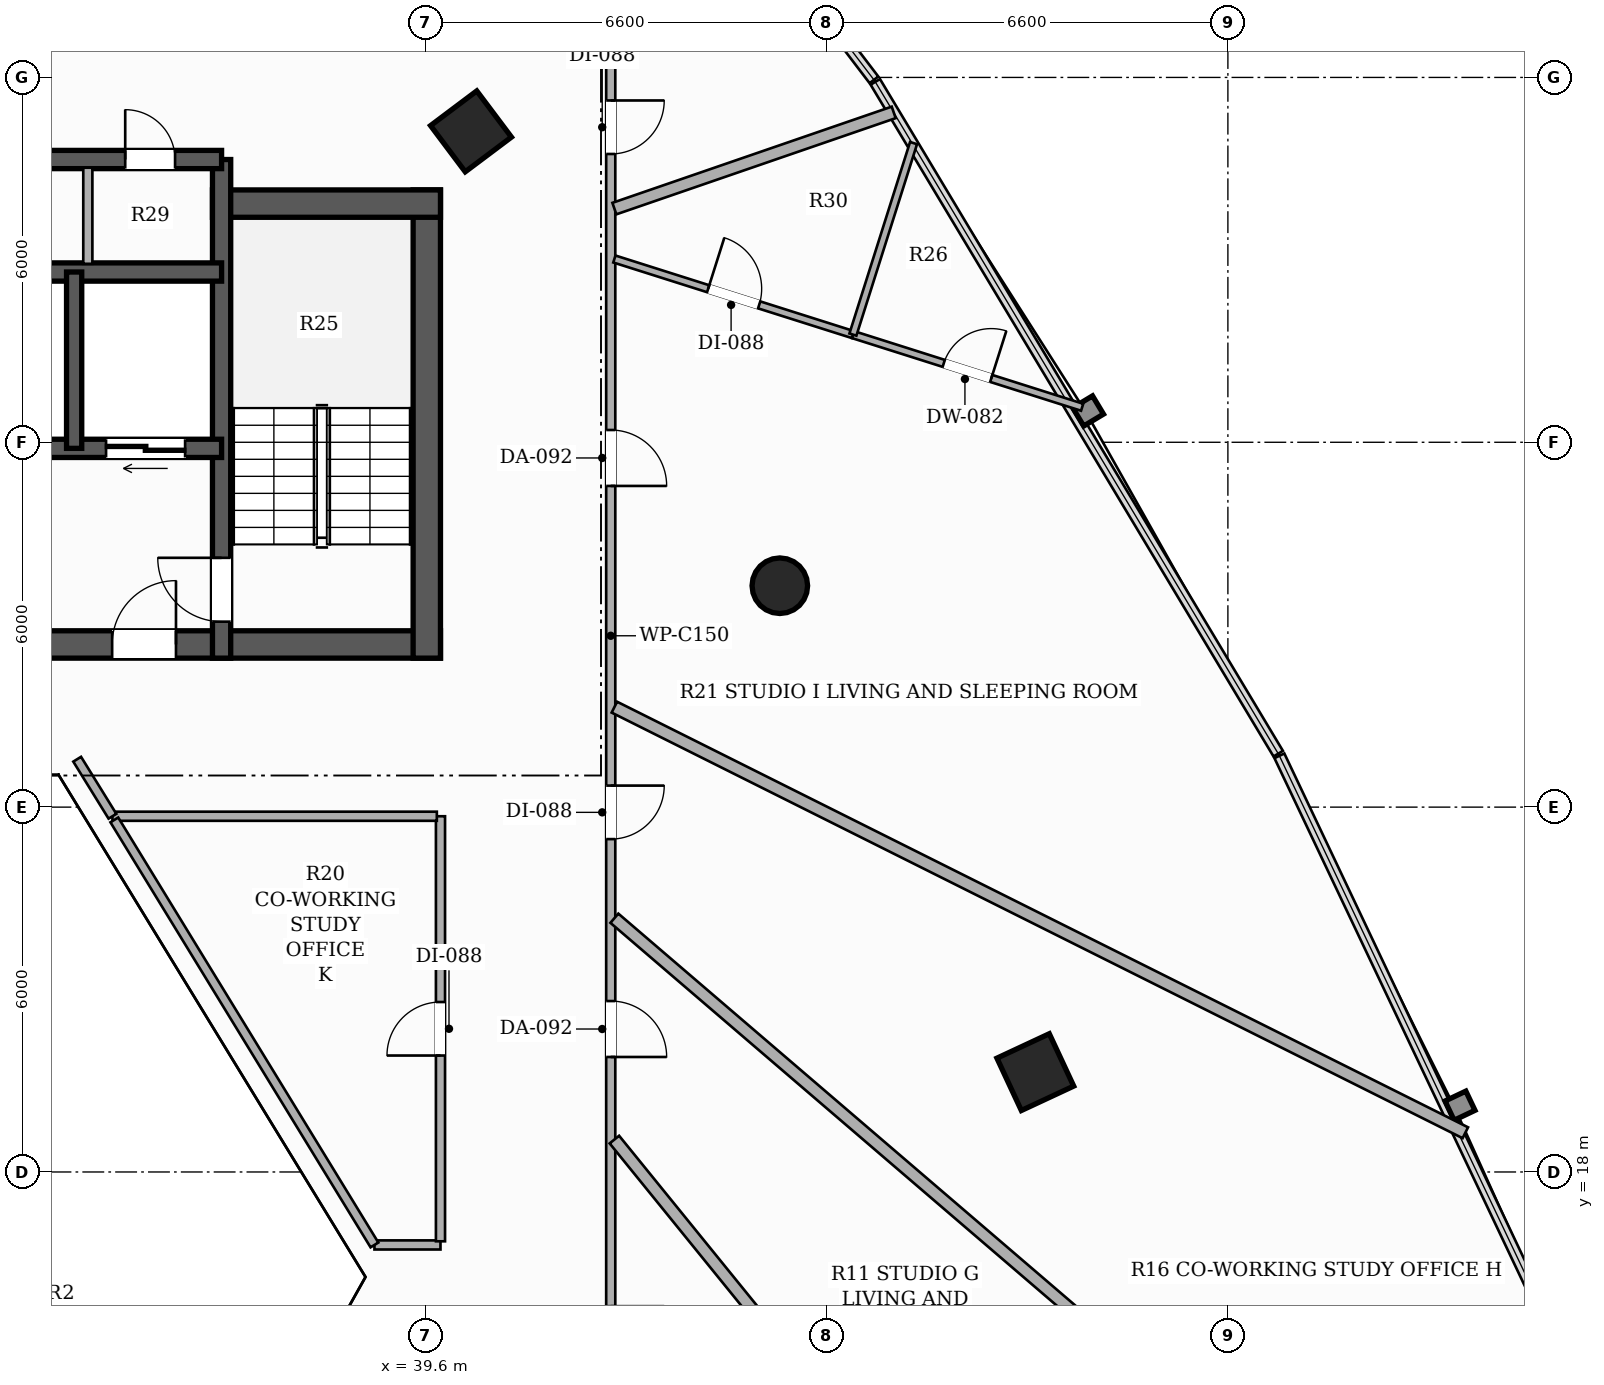
"""IFC4 building model, lengths in metres.
Left out: names, types, materials, properties, quantities, classifications, styles, units other than length and angle.
Written with IfcOpenShell. Run it as: python <this file> out.ifc"""

import sys

from ifc_helpers import new_model, si_unit, direction, frame, frame_2d, origin, origin_2d, place, context, subcontext, project, spatial, rectangle, hollow_rectangle, hollow_circle, extrude, element, fill, save


model = new_model("IFC4")
c1 = context("Model", 3, precision=1e-05, world=origin(), true_north=direction((0.0, 1.0)))
c2 = subcontext(c1, "Body", "Model", "MODEL_VIEW")
j1 = project(units=[si_unit("LENGTHUNIT", "METRE"), si_unit("PLANEANGLEUNIT", "RADIAN")], contexts=[c1])
p1 = place(None, origin())
s1 = spatial("IfcSite", under=j1, at=p1, CompositionType="ELEMENT")
p2 = place(p1, origin())
s2 = spatial("IfcBuilding", under=s1, at=p2, CompositionType="ELEMENT")
p3 = place(p2, frame((0.0, 0.0, 40.1)))
s3 = spatial("IfcBuildingStorey", under=s2, at=p3, CompositionType="ELEMENT", Elevation=40.1)
p4 = place(p3, frame((26.15, 26.675, 0.0), z_axis=(0.0, 0.0, 1.0), x_axis=(1.0, 0.0, 0.0)))
e1 = element("IfcWall", 1, at=p4, inside=s3, PredefinedType="SHEAR", context=c2, shape_type="SweptSolid", body=[
    extrude(rectangle(XDim=13.7, YDim=0.45, at=frame_2d((6.85, 0.0))), origin(), (0.0, 0.0, 1.0), 3.3),
])
p5 = place(p4, frame((4.35, 0.0, 0.0)))
e2 = element("IfcOpeningElement", 2, at=p5, cuts=e1, PredefinedType="OPENING", context=c2, shape_type="SweptSolid", body=[
    extrude(rectangle(XDim=1.05, YDim=2.15, at=frame_2d((0.525, 1.075))), frame((0.0, 0.235, 0.0), z_axis=(0.0, -1.0, 0.0), x_axis=(1.0, 0.0, 0.0)), (0.0, 0.0, 1.0), 0.47),
])
p6 = place(p4, frame((8.3, 0.0, 0.0)))
e3 = element("IfcOpeningElement", 3, at=p6, cuts=e1, PredefinedType="OPENING", context=c2, shape_type="SweptSolid", body=[
    extrude(rectangle(XDim=1.05, YDim=2.15, at=frame_2d((0.525, 1.075))), frame((0.0, 0.235, 0.0), z_axis=(0.0, -1.0, 0.0), x_axis=(1.0, 0.0, 0.0)), (0.0, 0.0, 1.0), 0.47),
])
p7 = place(p3, frame((39.625, 26.45, 0.0), z_axis=(0.0, 0.0, 1.0), x_axis=(0.0, 1.0, 0.0)))
e4 = element("IfcWall", 4, at=p7, inside=s3, PredefinedType="SHEAR", context=c2, shape_type="SweptSolid", body=[
    extrude(rectangle(XDim=7.7, YDim=0.45, at=frame_2d((3.85, 0.0))), origin(), (0.0, 0.0, 1.0), 3.3),
])
p8 = place(p3, frame((36.1, 33.925, 0.0), z_axis=(0.0, 0.0, 1.0), x_axis=(1.0, 0.0, 0.0)))
e5 = element("IfcWall", 5, at=p8, inside=s3, PredefinedType="SHEAR", context=c2, shape_type="SweptSolid", body=[
    extrude(rectangle(XDim=3.75, YDim=0.45, at=frame_2d((1.875, 0.0))), origin(), (0.0, 0.0, 1.0), 3.3),
])
p9 = place(p3, frame((36.25, 26.45, 0.0), z_axis=(0.0, 0.0, 1.0), x_axis=(0.0, 1.0, 0.0)))
e6 = element("IfcWall", 6, at=p9, inside=s3, PredefinedType="SHEAR", context=c2, shape_type="SweptSolid", body=[
    extrude(rectangle(XDim=8.2, YDim=0.3, at=frame_2d((4.1, 0.0))), origin(), (0.0, 0.0, 1.0), 3.3),
])
p10 = place(p9, frame((0.6, 0.0, 0.0)))
e7 = element("IfcOpeningElement", 7, at=p10, cuts=e6, PredefinedType="OPENING", context=c2, shape_type="SweptSolid", body=[
    extrude(rectangle(XDim=1.05, YDim=2.15, at=frame_2d((0.525, 1.075))), frame((0.0, 0.16, 0.0), z_axis=(0.0, -1.0, 0.0), x_axis=(1.0, 0.0, 0.0)), (0.0, 0.0, 1.0), 0.32),
])
p11 = place(p3, frame((36.25, 29.9, 0.0), z_axis=(0.0, 0.0, 1.0), x_axis=(-1.0, 0.0, 0.0)))
e8 = element("IfcWall", 8, at=p11, inside=s3, PredefinedType="SHEAR", context=c2, shape_type="SweptSolid", body=[
    extrude(rectangle(XDim=6.5, YDim=0.3, at=frame_2d((3.25, 0.0))), origin(), (0.0, 0.0, 1.0), 3.3),
])
p12 = place(p11, frame((4.875, 0.0, 0.0)))
e9 = element("IfcOpeningElement", 9, at=p12, cuts=e8, PredefinedType="OPENING", context=c2, shape_type="SweptSolid", body=[
    extrude(rectangle(XDim=1.1, YDim=2.2, at=frame_2d((0.55, 1.1))), frame((0.0, 0.16, 0.0), z_axis=(0.0, -1.0, 0.0), x_axis=(1.0, 0.0, 0.0)), (0.0, 0.0, 1.0), 0.32),
])
p13 = place(p11, frame((2.875, 0.0, 0.0)))
e10 = element("IfcOpeningElement", 10, at=p13, cuts=e8, PredefinedType="OPENING", context=c2, shape_type="SweptSolid", body=[
    extrude(rectangle(XDim=1.1, YDim=2.2, at=frame_2d((0.55, 1.1))), frame((0.0, 0.16, 0.0), z_axis=(0.0, -1.0, 0.0), x_axis=(1.0, 0.0, 0.0)), (0.0, 0.0, 1.0), 0.32),
])
p14 = place(p11, frame((0.6, 0.0, 0.0)))
e11 = element("IfcOpeningElement", 11, at=p14, cuts=e8, PredefinedType="OPENING", context=c2, shape_type="SweptSolid", body=[
    extrude(rectangle(XDim=1.3, YDim=2.2, at=frame_2d((0.65, 1.1))), frame((0.0, 0.16, 0.0), z_axis=(0.0, -1.0, 0.0), x_axis=(1.0, 0.0, 0.0)), (0.0, 0.0, 1.0), 0.32),
])
p15 = place(p3, frame((29.75, 32.8, 0.0), z_axis=(0.0, 0.0, 1.0), x_axis=(1.0, 0.0, 0.0)))
e12 = element("IfcWall", 12, at=p15, inside=s3, PredefinedType="SHEAR", context=c2, shape_type="SweptSolid", body=[
    extrude(rectangle(XDim=6.5, YDim=0.3, at=frame_2d((3.25, 0.0))), origin(), (0.0, 0.0, 1.0), 3.3),
])
p16 = place(p3, frame((33.825, 29.9, 0.0), z_axis=(0.0, 0.0, 1.0), x_axis=(0.0, 1.0, 0.0)))
e13 = element("IfcWall", 13, at=p16, inside=s3, PredefinedType="SHEAR", context=c2, shape_type="SweptSolid", body=[
    extrude(rectangle(XDim=2.9, YDim=0.25, at=frame_2d((1.45, 0.0))), origin(), (0.0, 0.0, 1.0), 3.3),
])
p17 = place(p3, frame((29.75, 34.65, 0.0), z_axis=(0.0, 0.0, 1.0), x_axis=(1.0, 0.0, 0.0)))
e14 = element("IfcWall", 14, at=p17, inside=s3, PredefinedType="SHEAR", context=c2, shape_type="SweptSolid", body=[
    extrude(rectangle(XDim=6.5, YDim=0.3, at=frame_2d((3.25, 0.0))), origin(), (0.0, 0.0, 1.0), 3.3),
])
p18 = place(p17, frame((0.765, 0.0, 0.0)))
e15 = element("IfcOpeningElement", 15, at=p18, cuts=e14, PredefinedType="OPENING", context=c2, shape_type="SweptSolid", body=[
    extrude(rectangle(XDim=0.82, YDim=2.1, at=frame_2d((0.41, 1.05))), frame((0.0, 0.16, 0.0), z_axis=(0.0, -1.0, 0.0), x_axis=(1.0, 0.0, 0.0)), (0.0, 0.0, 1.0), 0.32),
])
p19 = place(p17, frame((2.84, 0.0, 0.0)))
e16 = element("IfcOpeningElement", 16, at=p19, cuts=e14, PredefinedType="OPENING", context=c2, shape_type="SweptSolid", body=[
    extrude(rectangle(XDim=0.82, YDim=2.1, at=frame_2d((0.41, 1.05))), frame((0.0, 0.16, 0.0), z_axis=(0.0, -1.0, 0.0), x_axis=(1.0, 0.0, 0.0)), (0.0, 0.0, 1.0), 0.32),
])
p20 = place(p17, frame((4.915, 0.0, 0.0)))
e17 = element("IfcOpeningElement", 17, at=p20, cuts=e14, PredefinedType="OPENING", context=c2, shape_type="SweptSolid", body=[
    extrude(rectangle(XDim=0.82, YDim=2.1, at=frame_2d((0.41, 1.05))), frame((0.0, 0.16, 0.0), z_axis=(0.0, -1.0, 0.0), x_axis=(1.0, 0.0, 0.0)), (0.0, 0.0, 1.0), 0.32),
])
p21 = place(p3, frame((49.633, 19.642, 0.0), z_axis=(0.0, 0.0, 1.0), x_axis=(-0.422618261741, 0.906307787037, 0.0)))
e18 = element("IfcColumn", 18, at=p21, inside=s3, PredefinedType="COLUMN", context=c2, shape_type="SweptSolid", body=[
    extrude(hollow_rectangle(XDim=0.95, YDim=0.95, WallThickness=0.032, at=origin_2d()), origin(), (0.0, 0.0, 1.0), 3.3),
])
p22 = place(p3, frame((45.431, 27.641, 0.0), z_axis=(0.0, 0.0, 1.0), x_axis=(1.0, 0.0, 0.0)))
e19 = element("IfcColumn", 19, at=p22, inside=s3, PredefinedType="COLUMN", context=c2, shape_type="SweptSolid", body=[
    extrude(hollow_circle(Radius=0.457, WallThickness=0.025, at=origin_2d()), origin(), (0.0, 0.0, 1.0), 3.3),
])
p23 = place(p3, frame((40.352, 35.113, 0.0), z_axis=(0.0, 0.0, 1.0), x_axis=(-0.600420225326, 0.799684658487, 0.0)))
e20 = element("IfcColumn", 20, at=p23, inside=s3, PredefinedType="COLUMN", context=c2, shape_type="SweptSolid", body=[
    extrude(hollow_rectangle(XDim=0.95, YDim=0.95, WallThickness=0.032, at=origin_2d()), origin(), (0.0, 0.0, 1.0), 3.3),
])
p24 = place(p3, frame((34.05, 32.935, 0.0), z_axis=(0.0, 0.0, 1.0), x_axis=(0.0, 1.0, 0.0)))
e21 = element("IfcWall", 21, at=p24, inside=s3, PredefinedType="PARTITIONING", context=c2, shape_type="SweptSolid", body=[
    extrude(rectangle(XDim=1.58, YDim=0.15, at=frame_2d((0.79, 0.0))), origin(), (0.0, 0.0, 1.0), 3.06),
])
p25 = place(p3, frame((42.65, 36.84, 0.0), z_axis=(0.0, 0.0, 1.0), x_axis=(0.0, -1.0, 0.0)))
e22 = element("IfcWall", 22, at=p25, inside=s3, PredefinedType="PARTITIONING", context=c2, shape_type="SweptSolid", body=[
    extrude(rectangle(XDim=25.04, YDim=0.15, at=frame_2d((12.52, 0.0))), origin(), (0.0, 0.0, 1.0), 2.413),
])
p26 = place(p25, frame((1.219, 0.0, 0.0)))
e23 = element("IfcOpeningElement", 23, at=p26, cuts=e22, PredefinedType="OPENING", context=c2, shape_type="SweptSolid", body=[
    extrude(rectangle(XDim=0.88, YDim=2.1, at=frame_2d((0.44, 1.05))), frame((0.0, 0.085, 0.0), z_axis=(0.0, -1.0, 0.0), x_axis=(1.0, 0.0, 0.0)), (0.0, 0.0, 1.0), 0.17),
])
p27 = place(p25, frame((21.047, 0.0, 0.0)))
e24 = element("IfcOpeningElement", 24, at=p27, cuts=e22, PredefinedType="OPENING", context=c2, shape_type="SweptSolid", body=[
    extrude(rectangle(XDim=0.88, YDim=2.1, at=frame_2d((0.44, 1.05))), frame((0.0, 0.085, 0.0), z_axis=(0.0, -1.0, 0.0), x_axis=(1.0, 0.0, 0.0)), (0.0, 0.0, 1.0), 0.17),
])
p28 = place(p25, frame((16.029, 0.0, 0.0)))
e25 = element("IfcOpeningElement", 25, at=p28, cuts=e22, PredefinedType="OPENING", context=c2, shape_type="SweptSolid", body=[
    extrude(rectangle(XDim=0.92, YDim=2.15, at=frame_2d((0.46, 1.075))), frame((0.0, 0.085, 0.0), z_axis=(0.0, -1.0, 0.0), x_axis=(1.0, 0.0, 0.0)), (0.0, 0.0, 1.0), 0.17),
])
p29 = place(p25, frame((12.486, 0.0, 0.0)))
e26 = element("IfcOpeningElement", 26, at=p29, cuts=e22, PredefinedType="OPENING", context=c2, shape_type="SweptSolid", body=[
    extrude(rectangle(XDim=0.88, YDim=2.1, at=frame_2d((0.44, 1.05))), frame((0.0, 0.085, 0.0), z_axis=(0.0, -1.0, 0.0), x_axis=(1.0, 0.0, 0.0)), (0.0, 0.0, 1.0), 0.17),
])
p30 = place(p25, frame((6.638, 0.0, 0.0)))
e27 = element("IfcOpeningElement", 27, at=p30, cuts=e22, PredefinedType="OPENING", context=c2, shape_type="SweptSolid", body=[
    extrude(rectangle(XDim=0.92, YDim=2.15, at=frame_2d((0.46, 1.075))), frame((0.0, 0.085, 0.0), z_axis=(0.0, -1.0, 0.0), x_axis=(1.0, 0.0, 0.0)), (0.0, 0.0, 1.0), 0.17),
])
p31 = place(p3, frame((38.764, 16.8, 0.0), z_axis=(0.0, 0.0, 1.0), x_axis=(1.0, 0.0, 0.0)))
e28 = element("IfcWall", 28, at=p31, inside=s3, PredefinedType="PARTITIONING", context=c2, shape_type="SweptSolid", body=[
    extrude(rectangle(XDim=1.086, YDim=0.15, at=frame_2d((0.543, 0.0))), origin(), (0.0, 0.0, 1.0), 3.06),
])
p32 = place(p3, frame((39.85, 16.86, 0.0), z_axis=(0.0, 0.0, 1.0), x_axis=(0.0, 1.0, 0.0)))
e29 = element("IfcWall", 29, at=p32, inside=s3, PredefinedType="PARTITIONING", context=c2, shape_type="SweptSolid", body=[
    extrude(rectangle(XDim=6.99, YDim=0.15, at=frame_2d((3.495, 0.0))), origin(), (0.0, 0.0, 1.0), 2.669),
])
p33 = place(p32, frame((3.055, 0.0, 0.0)))
e30 = element("IfcOpeningElement", 30, at=p33, cuts=e29, PredefinedType="OPENING", context=c2, shape_type="SweptSolid", body=[
    extrude(rectangle(XDim=0.88, YDim=2.1, at=frame_2d((0.44, 1.05))), frame((0.0, 0.085, 0.0), z_axis=(0.0, -1.0, 0.0), x_axis=(1.0, 0.0, 0.0)), (0.0, 0.0, 1.0), 0.17),
])
p34 = place(p3, frame((39.79, 23.85, 0.0), z_axis=(0.0, 0.0, 1.0), x_axis=(-1.0, 0.0, 0.0)))
e31 = element("IfcWall", 31, at=p34, inside=s3, PredefinedType="PARTITIONING", context=c2, shape_type="SweptSolid", body=[
    extrude(rectangle(XDim=5.335, YDim=0.15, at=frame_2d((2.667, 0.0))), origin(), (0.0, 0.0, 1.0), 2.669),
])
p35 = place(p3, frame((34.455, 23.85, 0.0), z_axis=(0.0, 0.0, 1.0), x_axis=(-0.525973516201, 0.850500946652, 0.0)))
e32 = element("IfcWall", 32, at=p35, inside=s3, PredefinedType="PARTITIONING", context=c2, shape_type="SweptSolid", body=[
    extrude(rectangle(XDim=1.103, YDim=0.15, at=frame_2d((0.551, 0.0))), origin(), (0.0, 0.0, 1.0), 3.06),
])
p36 = place(p3, frame((34.486, 23.79, 0.0), z_axis=(0.0, 0.0, 1.0), x_axis=(0.521998190399, -0.852946592244, 0.0)))
e33 = element("IfcWall", 33, at=p36, inside=s3, PredefinedType="PARTITIONING", context=c2, shape_type="SweptSolid", body=[
    extrude(rectangle(XDim=8.195, YDim=0.15, at=frame_2d((4.098, 0.0))), origin(), (0.0, 0.0, 1.0), 2.669),
])
p37 = place(p3, frame((47.304, 35.425, 0.0), z_axis=(0.0, 0.0, 1.0), x_axis=(-0.945506397197, -0.325603520956, 0.0)))
e34 = element("IfcWall", 34, at=p37, inside=s3, PredefinedType="PARTITIONING", context=c2, shape_type="SweptSolid", body=[
    extrude(rectangle(XDim=4.859, YDim=0.2, at=frame_2d((2.429, 0.0))), origin(), (0.0, 0.0, 1.0), 3.06),
])
p38 = place(p3, frame((42.71, 18.533, 0.0), z_axis=(0.0, 0.0, 1.0), x_axis=(0.630093983448, -0.776518880661, 0.0)))
e35 = element("IfcWall", 35, at=p38, inside=s3, PredefinedType="PARTITIONING", context=c2, shape_type="SweptSolid", body=[
    extrude(rectangle(XDim=20.078, YDim=0.2, at=frame_2d((10.039, 0.0))), origin(), (0.0, 0.0, 1.0), 2.413),
])
p39 = place(p3, frame((42.71, 22.173, 0.0), z_axis=(0.0, 0.0, 1.0), x_axis=(0.759115981911, -0.650955394791, 0.0)))
e36 = element("IfcWall", 36, at=p39, inside=s3, PredefinedType="PARTITIONING", context=c2, shape_type="SweptSolid", body=[
    extrude(rectangle(XDim=25.249, YDim=0.2, at=frame_2d((12.625, 0.0))), origin(), (0.0, 0.0, 1.0), 2.413),
])
p40 = place(p3, frame((42.71, 25.644, 0.0), z_axis=(0.0, 0.0, 1.0), x_axis=(0.894389742198, -0.447288485265, 0.0)))
e37 = element("IfcWall", 37, at=p40, inside=s3, PredefinedType="PARTITIONING", context=c2, shape_type="SweptSolid", body=[
    extrude(rectangle(XDim=15.648, YDim=0.2, at=frame_2d((7.824, 0.0))), origin(), (0.0, 0.0, 1.0), 2.413),
])
p41 = place(p3, frame((46.633, 31.771, 0.0), z_axis=(0.0, 0.0, 1.0), x_axis=(0.953252758263, -0.302174087016, 0.0)))
e38 = element("IfcWall", 38, at=p41, inside=s3, PredefinedType="PARTITIONING", context=c2, shape_type="SweptSolid", body=[
    extrude(rectangle(XDim=3.955, YDim=0.12, at=frame_2d((1.978, 0.0))), origin(), (0.0, 0.0, 1.0), 3.06),
])
p42 = place(p41, frame((1.567, 0.0, 0.0)))
e39 = element("IfcOpeningElement", 39, at=p42, cuts=e38, PredefinedType="OPENING", context=c2, shape_type="SweptSolid", body=[
    extrude(rectangle(XDim=0.82, YDim=2.1, at=frame_2d((0.41, 1.05))), frame((0.0, 0.07, 0.0), z_axis=(0.0, -1.0, 0.0), x_axis=(1.0, 0.0, 0.0)), (0.0, 0.0, 1.0), 0.14),
])
p43 = place(p3, frame((42.71, 33.014, 0.0), z_axis=(0.0, 0.0, 1.0), x_axis=(0.953299814988, -0.302025599484, 0.0)))
e40 = element("IfcWall", 40, at=p43, inside=s3, PredefinedType="PARTITIONING", context=c2, shape_type="SweptSolid", body=[
    extrude(rectangle(XDim=4.115, YDim=0.12, at=frame_2d((2.058, 0.0))), origin(), (0.0, 0.0, 1.0), 3.06),
])
p44 = place(p43, frame((1.618, 0.0, 0.0)))
e41 = element("IfcOpeningElement", 41, at=p44, cuts=e40, PredefinedType="OPENING", context=c2, shape_type="SweptSolid", body=[
    extrude(rectangle(XDim=0.88, YDim=2.1, at=frame_2d((0.44, 1.05))), frame((0.0, 0.07, 0.0), z_axis=(0.0, -1.0, 0.0), x_axis=(1.0, 0.0, 0.0)), (0.0, 0.0, 1.0), 0.14),
])
p45 = place(p3, frame((46.633, 31.771, 0.0), z_axis=(0.0, 0.0, 1.0), x_axis=(0.301799891186, 0.953371294764, 0.0)))
e42 = element("IfcWall", 42, at=p45, inside=s3, PredefinedType="PARTITIONING", context=c2, shape_type="SweptSolid", body=[
    extrude(rectangle(XDim=3.303, YDim=0.12, at=frame_2d((1.651, 0.0))), origin(), (0.0, 0.0, 1.0), 3.06),
])
p46 = place(p10, origin())
e43 = element("IfcDoor", 43, at=p46, inside=s3, OperationType="SINGLE_SWING_RIGHT", PredefinedType="DOOR", context=c2, shape_type="SweptSolid", body=[
    extrude(rectangle(XDim=1.05, YDim=2.15, at=frame_2d((0.525, 1.075))), frame((0.0, 0.025, 0.0), z_axis=(0.0, -1.0, 0.0), x_axis=(1.0, 0.0, 0.0)), (0.0, 0.0, 1.0), 0.05),
])
fill(e7, e43)
p47 = place(p6, origin())
e44 = element("IfcDoor", 44, at=p47, inside=s3, OperationType="SINGLE_SWING_RIGHT", PredefinedType="DOOR", context=c2, shape_type="SweptSolid", body=[
    extrude(rectangle(XDim=1.05, YDim=2.15, at=frame_2d((0.525, 1.075))), frame((0.0, 0.025, 0.0), z_axis=(0.0, -1.0, 0.0), x_axis=(1.0, 0.0, 0.0)), (0.0, 0.0, 1.0), 0.05),
])
fill(e3, e44)
p48 = place(p14, origin())
e45 = element("IfcDoor", 45, at=p48, inside=s3, OperationType="DOUBLE_DOOR_SLIDING", PredefinedType="DOOR", context=c2, shape_type="SweptSolid", body=[
    extrude(rectangle(XDim=1.3, YDim=2.2, at=frame_2d((0.65, 1.1))), frame((0.0, 0.025, 0.0), z_axis=(0.0, -1.0, 0.0), x_axis=(1.0, 0.0, 0.0)), (0.0, 0.0, 1.0), 0.05),
])
fill(e11, e45)
p49 = place(p20, origin())
e46 = element("IfcDoor", 46, at=p49, inside=s3, OperationType="SINGLE_SWING_LEFT", PredefinedType="DOOR", context=c2, shape_type="SweptSolid", body=[
    extrude(rectangle(XDim=0.82, YDim=2.1, at=frame_2d((0.41, 1.05))), frame((0.0, 0.025, 0.0), z_axis=(0.0, -1.0, 0.0), x_axis=(1.0, 0.0, 0.0)), (0.0, 0.0, 1.0), 0.05),
])
fill(e17, e46)
p50 = place(p26, origin())
e47 = element("IfcDoor", 47, at=p50, inside=s3, OperationType="SINGLE_SWING_LEFT", PredefinedType="DOOR", context=c2, shape_type="SweptSolid", body=[
    extrude(rectangle(XDim=0.88, YDim=2.1, at=frame_2d((0.44, 1.05))), frame((0.0, 0.025, 0.0), z_axis=(0.0, -1.0, 0.0), x_axis=(1.0, 0.0, 0.0)), (0.0, 0.0, 1.0), 0.05),
])
fill(e23, e47)
p51 = place(p28, origin())
e48 = element("IfcDoor", 48, at=p51, inside=s3, OperationType="SINGLE_SWING_RIGHT", PredefinedType="DOOR", context=c2, shape_type="SweptSolid", body=[
    extrude(rectangle(XDim=0.92, YDim=2.15, at=frame_2d((0.46, 1.075))), frame((0.0, 0.025, 0.0), z_axis=(0.0, -1.0, 0.0), x_axis=(1.0, 0.0, 0.0)), (0.0, 0.0, 1.0), 0.05),
])
fill(e25, e48)
p52 = place(p29, origin())
e49 = element("IfcDoor", 49, at=p52, inside=s3, OperationType="SINGLE_SWING_LEFT", PredefinedType="DOOR", context=c2, shape_type="SweptSolid", body=[
    extrude(rectangle(XDim=0.88, YDim=2.1, at=frame_2d((0.44, 1.05))), frame((0.0, 0.025, 0.0), z_axis=(0.0, -1.0, 0.0), x_axis=(1.0, 0.0, 0.0)), (0.0, 0.0, 1.0), 0.05),
])
fill(e26, e49)
p53 = place(p30, origin())
e50 = element("IfcDoor", 50, at=p53, inside=s3, OperationType="SINGLE_SWING_RIGHT", PredefinedType="DOOR", context=c2, shape_type="SweptSolid", body=[
    extrude(rectangle(XDim=0.92, YDim=2.15, at=frame_2d((0.46, 1.075))), frame((0.0, 0.025, 0.0), z_axis=(0.0, -1.0, 0.0), x_axis=(1.0, 0.0, 0.0)), (0.0, 0.0, 1.0), 0.05),
])
fill(e27, e50)
p54 = place(p42, origin())
e51 = element("IfcDoor", 51, at=p54, inside=s3, OperationType="SINGLE_SWING_RIGHT", PredefinedType="DOOR", context=c2, shape_type="SweptSolid", body=[
    extrude(rectangle(XDim=0.82, YDim=2.1, at=frame_2d((0.41, 1.05))), frame((0.0, 0.025, 0.0), z_axis=(0.0, -1.0, 0.0), x_axis=(1.0, 0.0, 0.0)), (0.0, 0.0, 1.0), 0.05),
])
fill(e39, e51)
p55 = place(p44, origin())
e52 = element("IfcDoor", 52, at=p55, inside=s3, OperationType="SINGLE_SWING_LEFT", PredefinedType="DOOR", context=c2, shape_type="SweptSolid", body=[
    extrude(rectangle(XDim=0.88, YDim=2.1, at=frame_2d((0.44, 1.05))), frame((0.0, 0.025, 0.0), z_axis=(0.0, -1.0, 0.0), x_axis=(1.0, 0.0, 0.0)), (0.0, 0.0, 1.0), 0.05),
])
fill(e41, e52)
p56 = place(p33, origin())
e53 = element("IfcDoor", 53, at=p56, inside=s3, OperationType="SINGLE_SWING_LEFT", PredefinedType="DOOR", context=c2, shape_type="SweptSolid", body=[
    extrude(rectangle(XDim=0.88, YDim=2.1, at=frame_2d((0.44, 1.05))), frame((0.0, 0.025, 0.0), z_axis=(0.0, -1.0, 0.0), x_axis=(1.0, 0.0, 0.0)), (0.0, 0.0, 1.0), 0.05),
])
fill(e30, e53)
save(model, sys.argv[1])
